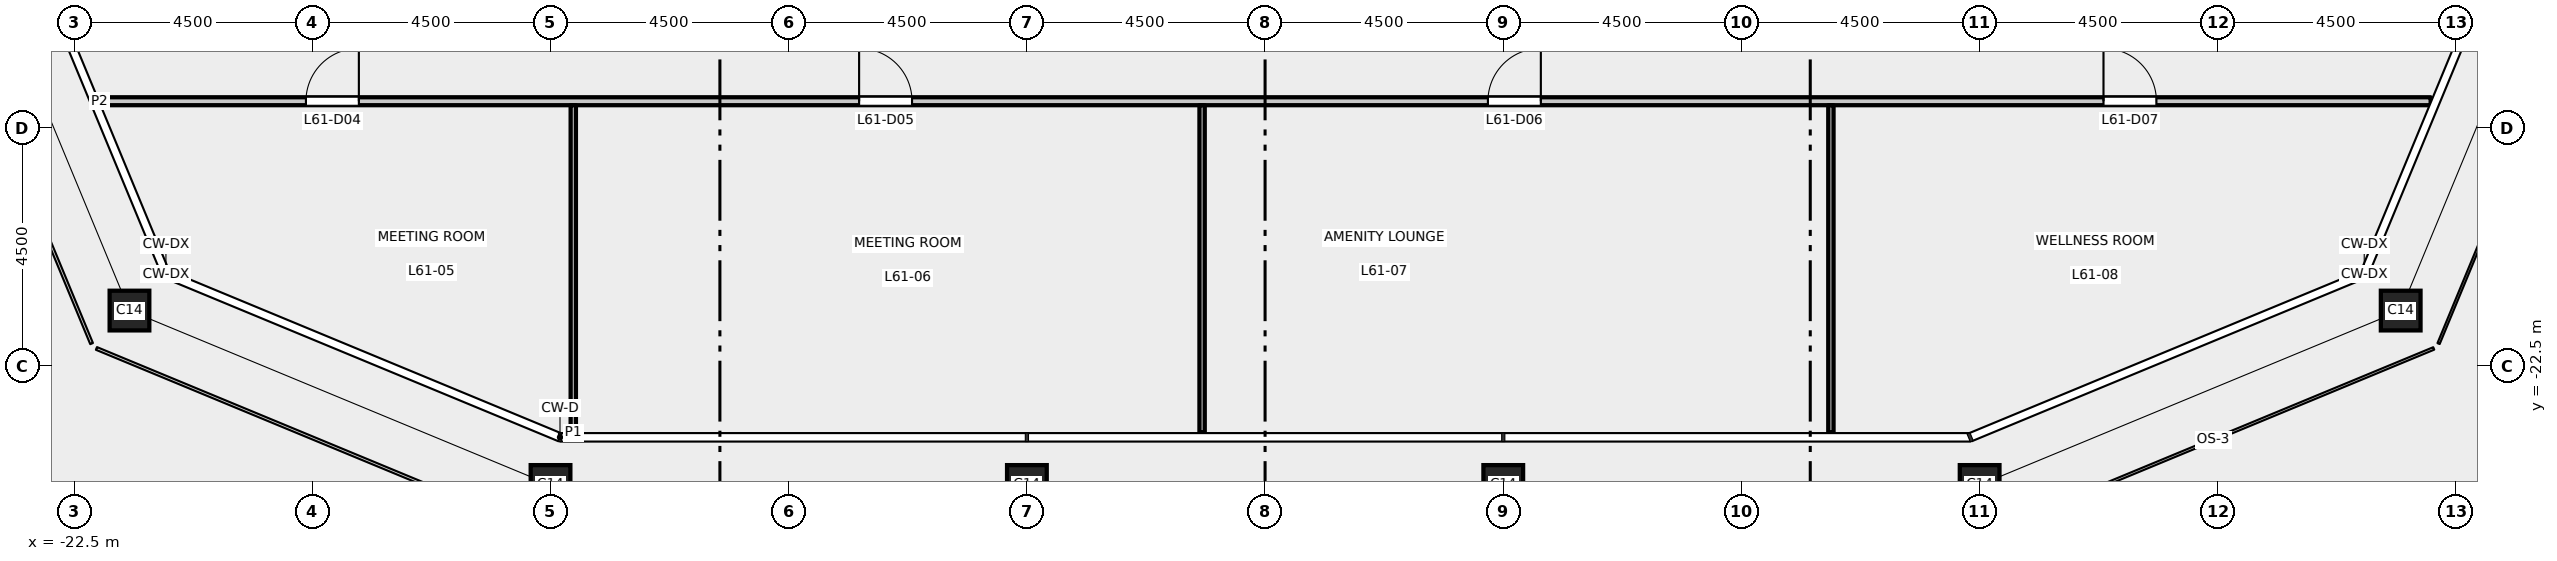
"""IFC4 building model, lengths in metres.
Left out: names, types, materials, properties, quantities, classifications, styles, units other than length and angle.
Written with IfcOpenShell. Run it as: python <this file> out.ifc"""

import sys

from ifc_helpers import new_model, si_unit, direction, frame, frame_2d, origin, origin_2d, place, context, subcontext, project, spatial, rectangle, hollow_rectangle, extrude, element, fill, save


model = new_model("IFC4")
c1 = context("Model", 3, precision=1e-05, world=origin(), true_north=direction((0.0, 1.0)))
c2 = subcontext(c1, "Body", "Model", "MODEL_VIEW")
j1 = project(units=[si_unit("LENGTHUNIT", "METRE"), si_unit("PLANEANGLEUNIT", "RADIAN")], contexts=[c1])
p1 = place(None, origin())
s1 = spatial("IfcSite", under=j1, at=p1, CompositionType="ELEMENT")
p2 = place(p1, origin())
s2 = spatial("IfcBuilding", under=s1, at=p2, CompositionType="ELEMENT")
p3 = place(p2, frame((0.0, 0.0, 284.2)))
s3 = spatial("IfcBuildingStorey", under=s2, at=p3, CompositionType="ELEMENT", Elevation=284.2)
for number, where, z_axis, x_axis in (
    (1, (-13.5, -24.75, -0.2), (0.0, 0.0, 1.0), (1.0, 0.0, 0.0)),
    (2, (-4.5, -24.75, -0.2), (0.0, 0.0, 1.0), (1.0, 0.0, 0.0)),
    (3, (4.5, -24.75, -0.2), (0.0, 0.0, 1.0), (1.0, 0.0, 0.0)),
    (4, (13.5, -24.75, -0.2), (0.0, 0.0, 1.0), (1.0, 0.0, 0.0)),
    (5, (21.455, -21.455, -0.2), (0.0, 0.0, 1.0), (1.0, 0.0, 0.0)),
    (6, (-21.455, -21.455, -0.2), (0.0, 0.0, 1.0), (1.0, 0.0, 0.0)),
):
    element("IfcColumn", number, at=place(p3, frame(where, z_axis=z_axis, x_axis=x_axis)), inside=s3, PredefinedType="COLUMN", context=c2, shape_type="SweptSolid", body=[
        extrude(hollow_rectangle(XDim=0.75, YDim=0.75, WallThickness=0.04, at=origin_2d()), origin(), (0.0, 0.0, 1.0), 5.7),
    ])
p4 = place(p3, frame((-22.021, -17.5, 0.0), z_axis=(0.0, 0.0, 1.0), x_axis=(1.0, 0.0, 0.0)))
e7 = element("IfcWall", 7, at=p4, inside=s3, PredefinedType="PARTITIONING", context=c2, shape_type="SweptSolid", body=[
    extrude(rectangle(XDim=44.042, YDim=0.15, at=frame_2d((22.021, 0.0))), origin(), (0.0, 0.0, 1.0), 5.35),
])
p5 = place(p4, frame((3.9, 0.0, 0.0)))
e8 = element("IfcOpeningElement", 8, at=p5, cuts=e7, PredefinedType="OPENING", context=c2, shape_type="SweptSolid", body=[
    extrude(rectangle(XDim=1.0, YDim=2.1, at=frame_2d((0.5, 1.05))), frame((0.0, 0.085, 0.0), z_axis=(0.0, -1.0, 0.0), x_axis=(1.0, 0.0, 0.0)), (0.0, 0.0, 1.0), 0.17),
])
p6 = place(p4, frame((14.351, 0.0, 0.0)))
e9 = element("IfcOpeningElement", 9, at=p6, cuts=e7, PredefinedType="OPENING", context=c2, shape_type="SweptSolid", body=[
    extrude(rectangle(XDim=1.0, YDim=2.1, at=frame_2d((0.5, 1.05))), frame((0.0, 0.085, 0.0), z_axis=(0.0, -1.0, 0.0), x_axis=(1.0, 0.0, 0.0)), (0.0, 0.0, 1.0), 0.17),
])
p7 = place(p4, frame((26.231, 0.0, 0.0)))
e10 = element("IfcOpeningElement", 10, at=p7, cuts=e7, PredefinedType="OPENING", context=c2, shape_type="SweptSolid", body=[
    extrude(rectangle(XDim=1.0, YDim=2.1, at=frame_2d((0.5, 1.05))), frame((0.0, 0.085, 0.0), z_axis=(0.0, -1.0, 0.0), x_axis=(1.0, 0.0, 0.0)), (0.0, 0.0, 1.0), 0.17),
])
p8 = place(p4, frame((37.861, 0.0, 0.0)))
e11 = element("IfcOpeningElement", 11, at=p8, cuts=e7, PredefinedType="OPENING", context=c2, shape_type="SweptSolid", body=[
    extrude(rectangle(XDim=1.0, YDim=2.1, at=frame_2d((0.5, 1.05))), frame((0.0, 0.085, 0.0), z_axis=(0.0, -1.0, 0.0), x_axis=(1.0, 0.0, 0.0)), (0.0, 0.0, 1.0), 0.17),
])
for number, where, z_axis, x_axis in (
    (12, (-13.07, -23.76, 0.0), (0.0, 0.0, 1.0), (0.0, 1.0, 0.0)),
    (13, (-1.19, -23.76, 0.0), (0.0, 0.0, 1.0), (0.0, 1.0, 0.0)),
    (14, (10.69, -23.76, 0.0), (0.0, 0.0, 1.0), (0.0, 1.0, 0.0)),
):
    element("IfcWall", number, at=place(p3, frame(where, z_axis=z_axis, x_axis=x_axis)), inside=s3, PredefinedType="PARTITIONING", context=c2, shape_type="SweptSolid", body=[
        extrude(rectangle(XDim=6.185, YDim=0.1, at=frame_2d((3.093, 0.0))), origin(), (0.0, 0.0, 1.0), 5.35),
    ])
p9 = place(p5, origin())
e15 = element("IfcDoor", 15, at=p9, inside=s3, OperationType="SINGLE_SWING_RIGHT", PredefinedType="DOOR", context=c2, shape_type="SweptSolid", body=[
    extrude(rectangle(XDim=1.0, YDim=2.1, at=frame_2d((0.5, 1.05))), frame((0.0, 0.025, 0.0), z_axis=(0.0, -1.0, 0.0), x_axis=(1.0, 0.0, 0.0)), (0.0, 0.0, 1.0), 0.05),
])
fill(e8, e15)
p10 = place(p6, origin())
e16 = element("IfcDoor", 16, at=p10, inside=s3, OperationType="SINGLE_SWING_LEFT", PredefinedType="DOOR", context=c2, shape_type="SweptSolid", body=[
    extrude(rectangle(XDim=1.0, YDim=2.1, at=frame_2d((0.5, 1.05))), frame((0.0, 0.025, 0.0), z_axis=(0.0, -1.0, 0.0), x_axis=(1.0, 0.0, 0.0)), (0.0, 0.0, 1.0), 0.05),
])
fill(e9, e16)
p11 = place(p7, origin())
e17 = element("IfcDoor", 17, at=p11, inside=s3, OperationType="SINGLE_SWING_RIGHT", PredefinedType="DOOR", context=c2, shape_type="SweptSolid", body=[
    extrude(rectangle(XDim=1.0, YDim=2.1, at=frame_2d((0.5, 1.05))), frame((0.0, 0.025, 0.0), z_axis=(0.0, -1.0, 0.0), x_axis=(1.0, 0.0, 0.0)), (0.0, 0.0, 1.0), 0.05),
])
fill(e10, e17)
p12 = place(p8, origin())
e18 = element("IfcDoor", 18, at=p12, inside=s3, OperationType="SINGLE_SWING_LEFT", PredefinedType="DOOR", context=c2, shape_type="SweptSolid", body=[
    extrude(rectangle(XDim=1.0, YDim=2.1, at=frame_2d((0.5, 1.05))), frame((0.0, 0.025, 0.0), z_axis=(0.0, -1.0, 0.0), x_axis=(1.0, 0.0, 0.0)), (0.0, 0.0, 1.0), 0.05),
])
fill(e11, e18)
save(model, sys.argv[1])
